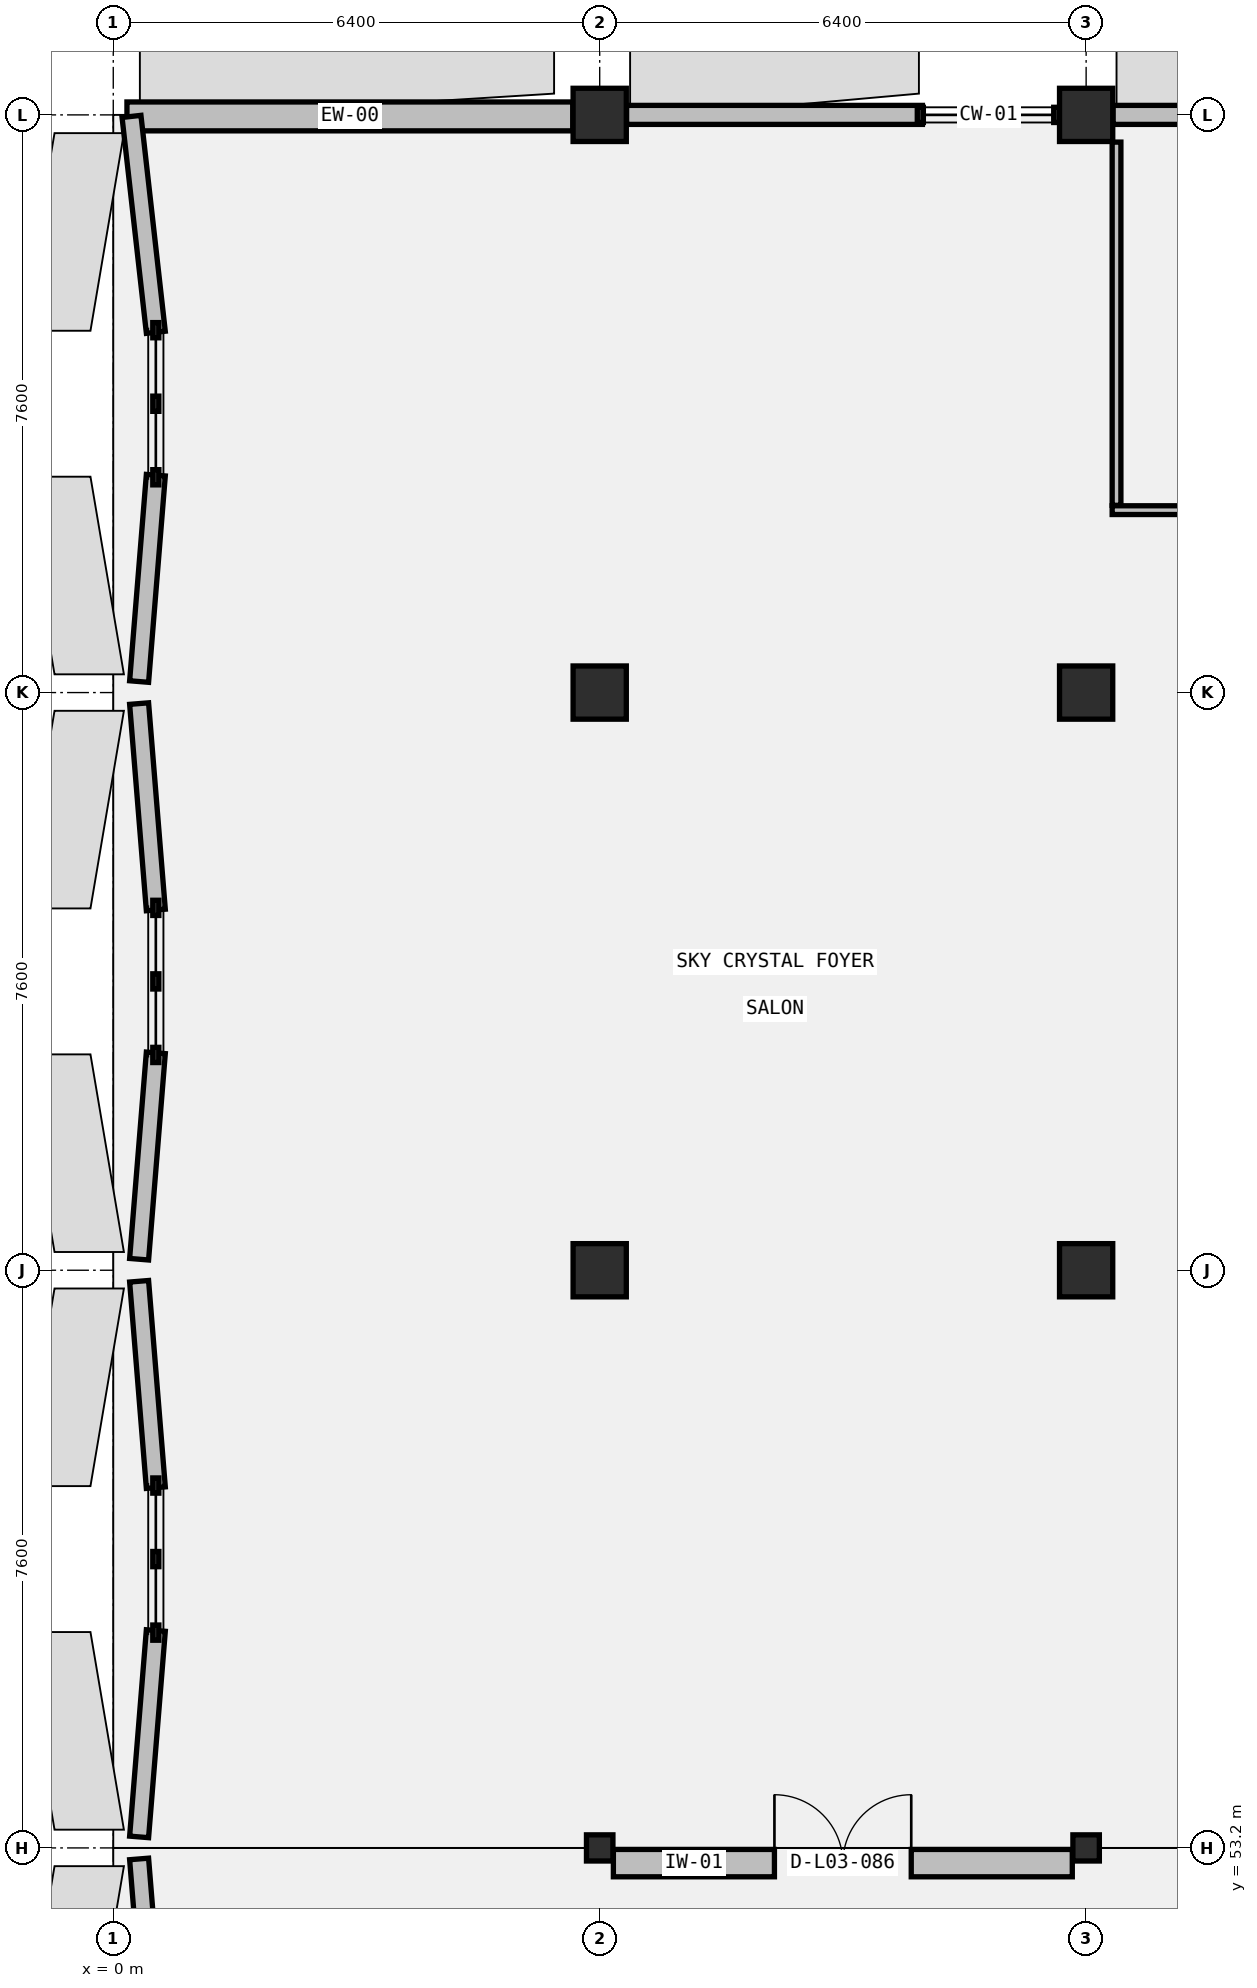
"""IFC4 building model, lengths in metres.
Left out: names, types, materials, properties, quantities, classifications, styles, units other than length and angle.
Written with IfcOpenShell. Run it as: python <this file> out.ifc"""

import sys

from ifc_helpers import new_model, si_unit, direction, frame, frame_2d, origin, origin_2d, place, context, subcontext, project, spatial, rectangle, circle, i_section, extrude, element, fill, save


model = new_model("IFC4")
c1 = context("Model", 3, precision=1e-05, world=origin(), true_north=direction((0.0, 1.0)))
c2 = subcontext(c1, "Body", "Model", "MODEL_VIEW")
j1 = project(units=[si_unit("LENGTHUNIT", "METRE"), si_unit("PLANEANGLEUNIT", "RADIAN")], contexts=[c1])
p1 = place(None, origin())
s1 = spatial("IfcSite", under=j1, at=p1, CompositionType="ELEMENT")
p2 = place(p1, origin())
s2 = spatial("IfcBuilding", under=s1, at=p2, CompositionType="ELEMENT")
p3 = place(p2, frame((0.0, 0.0, 14.6)))
s3 = spatial("IfcBuildingStorey", under=s2, at=p3, CompositionType="ELEMENT", Elevation=14.6)
p4 = place(p3, frame((6.4, 53.2, 0.0), z_axis=(0.0, 0.0, 1.0), x_axis=(1.0, 0.0, 0.0)))
e1 = element("IfcColumn", 1, at=p4, inside=s3, PredefinedType="COLUMN", context=c2, shape_type="SweptSolid", body=[
    extrude(i_section(OverallWidth=0.348, OverallDepth=0.344, WebThickness=0.01, FlangeThickness=0.016, FilletRadius=0.018, at=origin_2d()), origin(), (0.0, 0.0, 1.0), 4.6),
])
for number, where, z_axis, x_axis in (
    (2, (6.4, 60.8, 0.0), (0.0, 0.0, 1.0), (1.0, 0.0, 0.0)),
    (3, (6.4, 68.4, 0.0), (0.0, 0.0, 1.0), (1.0, 0.0, 0.0)),
    (4, (6.4, 76.0, 0.0), (0.0, 0.0, 1.0), (1.0, 0.0, 0.0)),
):
    element("IfcColumn", number, at=place(p3, frame(where, z_axis=z_axis, x_axis=x_axis)), inside=s3, PredefinedType="COLUMN", context=c2, shape_type="SweptSolid", body=[
        extrude(circle(Radius=0.35, at=origin_2d()), origin(), (0.0, 0.0, 1.0), 4.6),
    ])
p5 = place(p3, frame((12.8, 53.2, 0.0), z_axis=(0.0, 0.0, 1.0), x_axis=(1.0, 0.0, 0.0)))
e5 = element("IfcColumn", 5, at=p5, inside=s3, PredefinedType="COLUMN", context=c2, shape_type="SweptSolid", body=[
    extrude(i_section(OverallWidth=0.348, OverallDepth=0.344, WebThickness=0.01, FlangeThickness=0.016, FilletRadius=0.018, at=origin_2d()), origin(), (0.0, 0.0, 1.0), 4.6),
])
for number, where, z_axis, x_axis in (
    (6, (12.8, 60.8, 0.0), (0.0, 0.0, 1.0), (1.0, 0.0, 0.0)),
    (7, (12.8, 68.4, 0.0), (0.0, 0.0, 1.0), (1.0, 0.0, 0.0)),
    (8, (12.8, 76.0, 0.0), (0.0, 0.0, 1.0), (1.0, 0.0, 0.0)),
):
    element("IfcColumn", number, at=place(p3, frame(where, z_axis=z_axis, x_axis=x_axis)), inside=s3, PredefinedType="COLUMN", context=c2, shape_type="SweptSolid", body=[
        extrude(circle(Radius=0.35, at=origin_2d()), origin(), (0.0, 0.0, 1.0), 4.6),
    ])
p6 = place(p3, frame((0.18, 75.98, 0.0), z_axis=(0.0, 0.0, 1.0), x_axis=(1.0, 0.0, 0.0)))
e9 = element("IfcWall", 9, at=p6, inside=s3, PredefinedType="STANDARD", context=c2, shape_type="SweptSolid", body=[
    extrude(rectangle(XDim=5.866, YDim=0.38, at=frame_2d((2.933, 0.0))), origin(), (0.0, 0.0, 1.0), 3.638),
])
p7 = place(p3, frame((6.754, 76.0, 0.0), z_axis=(0.0, 0.0, 1.0), x_axis=(1.0, 0.0, 0.0)))
e10 = element("IfcWall", 10, at=p7, inside=s3, PredefinedType="STANDARD", context=c2, shape_type="SweptSolid", body=[
    extrude(rectangle(XDim=3.892, YDim=0.25, at=frame_2d((1.946, 0.0))), origin(), (0.0, 0.0, 1.0), 3.638),
])
p8 = place(p3, frame((13.154, 76.0, 0.0), z_axis=(0.0, 0.0, 1.0), x_axis=(1.0, 0.0, 0.0)))
e11 = element("IfcWall", 11, at=p8, inside=s3, PredefinedType="STANDARD", context=c2, shape_type="SweptSolid", body=[
    extrude(rectangle(XDim=3.892, YDim=0.25, at=frame_2d((1.946, 0.0))), origin(), (0.0, 0.0, 1.0), 3.638),
])
p9 = place(p3, frame((0.56, 50.34, 0.0), z_axis=(0.0, 0.0, 1.0), x_axis=(-0.080760513926, 0.996733534798, 0.0)))
e12 = element("IfcWall", 12, at=p9, inside=s3, PredefinedType="STANDARD", context=c2, shape_type="SweptSolid", body=[
    extrude(rectangle(XDim=2.724, YDim=0.25, at=frame_2d((1.362, 0.0))), origin(), (0.0, 0.0, 1.0), 3.638),
])
for number, where, z_axis, x_axis in (
    (13, (0.34, 53.345, 0.0), (0.0, 0.0, 1.0), (0.081, 0.997, 0.0)),
    (14, (0.56, 57.94, 0.0), (0.0, 0.0, 1.0), (-0.081, 0.997, 0.0)),
):
    element("IfcWall", number, at=place(p3, frame(where, z_axis=z_axis, x_axis=x_axis)), inside=s3, PredefinedType="STANDARD", context=c2, shape_type="SweptSolid", body=[
        extrude(rectangle(XDim=2.724, YDim=0.25, at=frame_2d((1.362, 0.0))), origin(), (0.0, 0.0, 1.0), 3.638),
    ])
for number, where, z_axis, x_axis in (
    (15, (0.34, 60.945, 0.0), (0.0, 0.0, 1.0), (0.081, 0.997, 0.0)),
    (16, (0.56, 65.54, 0.0), (0.0, 0.0, 1.0), (-0.081, 0.997, 0.0)),
):
    element("IfcWall", number, at=place(p3, frame(where, z_axis=z_axis, x_axis=x_axis)), inside=s3, PredefinedType="STANDARD", context=c2, shape_type="SweptSolid", body=[
        extrude(rectangle(XDim=2.724, YDim=0.25, at=frame_2d((1.362, 0.0))), origin(), (0.0, 0.0, 1.0), 3.638),
    ])
p10 = place(p3, frame((0.34, 68.545, 0.0), z_axis=(0.0, 0.0, 1.0), x_axis=(0.080753299301, 0.996734119338, 0.0)))
e17 = element("IfcWall", 17, at=p10, inside=s3, PredefinedType="STANDARD", context=c2, shape_type="SweptSolid", body=[
    extrude(rectangle(XDim=2.724, YDim=0.25, at=frame_2d((1.362, 0.0))), origin(), (0.0, 0.0, 1.0), 3.638),
])
p11 = place(p3, frame((0.56, 73.14, 0.0), z_axis=(0.0, 0.0, 1.0), x_axis=(-0.111987730746, 0.993709589449, 0.0)))
e18 = element("IfcWall", 18, at=p11, inside=s3, PredefinedType="STANDARD", context=c2, shape_type="SweptSolid", body=[
    extrude(rectangle(XDim=2.858, YDim=0.25, at=frame_2d((1.429, 0.0))), origin(), (0.0, 0.0, 1.0), 3.638),
])
p12 = place(p3, frame((13.143, 70.8, 0.0), z_axis=(0.0, 0.0, 1.0), x_axis=(1.0, 0.0, 0.0)))
e19 = element("IfcWall", 19, at=p12, inside=s3, PredefinedType="PARTITIONING", context=c2, shape_type="SweptSolid", body=[
    extrude(rectangle(XDim=5.715, YDim=0.115, at=frame_2d((2.857, 0.0))), origin(), (0.0, 0.0, 1.0), 4.36),
])
p13 = place(p12, frame((2.377, 0.0, 0.0)))
e20 = element("IfcOpeningElement", 20, at=p13, cuts=e19, PredefinedType="OPENING", context=c2, shape_type="SweptSolid", body=[
    extrude(rectangle(XDim=0.96, YDim=2.08, at=frame_2d((0.48, 1.04))), frame((0.0, 0.067, 0.0), z_axis=(0.0, -1.0, 0.0), x_axis=(1.0, 0.0, 0.0)), (0.0, 0.0, 1.0), 0.135),
])
p14 = place(p3, frame((13.2, 70.864, 0.0), z_axis=(0.0, 0.0, 1.0), x_axis=(0.0, 1.0, 0.0)))
e21 = element("IfcWall", 21, at=p14, inside=s3, PredefinedType="PARTITIONING", context=c2, shape_type="SweptSolid", body=[
    extrude(rectangle(XDim=4.779, YDim=0.115, at=frame_2d((2.389, 0.0))), origin(), (0.0, 0.0, 1.0), 4.36),
])
p15 = place(p3, frame((6.58, 53.0, 0.0), z_axis=(0.0, 0.0, 1.0), x_axis=(1.0, 0.0, 0.0)))
e22 = element("IfcWall", 22, at=p15, inside=s3, PredefinedType="PARTITIONING", context=c2, shape_type="SweptSolid", body=[
    extrude(rectangle(XDim=6.038, YDim=0.36, at=frame_2d((3.019, 0.0))), origin(), (0.0, 0.0, 1.0), 3.638),
])
p16 = place(p15, frame((2.119, 0.0, 0.0)))
e23 = element("IfcOpeningElement", 23, at=p16, cuts=e22, PredefinedType="OPENING", context=c2, shape_type="SweptSolid", body=[
    extrude(rectangle(XDim=1.8, YDim=2.4, at=frame_2d((0.9, 1.2))), frame((0.0, 0.19, 0.0), z_axis=(0.0, -1.0, 0.0), x_axis=(1.0, 0.0, 0.0)), (0.0, 0.0, 1.0), 0.38),
])
p17 = place(p16, origin())
e24 = element("IfcDoor", 24, at=p17, inside=s3, OperationType="DOUBLE_DOOR_SINGLE_SWING", PredefinedType="DOOR", context=c2, shape_type="SweptSolid", body=[
    extrude(rectangle(XDim=1.8, YDim=2.4, at=frame_2d((0.9, 1.2))), frame((0.0, 0.025, 0.0), z_axis=(0.0, -1.0, 0.0), x_axis=(1.0, 0.0, 0.0)), (0.0, 0.0, 1.0), 0.05),
])
fill(e23, e24)
save(model, sys.argv[1])
